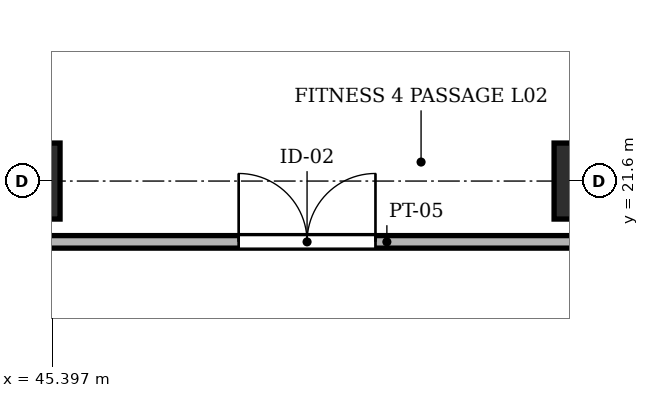
"""IFC4 building model, lengths in metres.
Left out: names, types, materials, properties, quantities, classifications, styles, units other than length and angle.
Written with IfcOpenShell. Run it as: python <this file> out.ifc"""

import sys

from ifc_helpers import new_model, si_unit, direction, frame, frame_2d, origin, origin_2d, place, context, subcontext, project, spatial, rectangle, extrude, element, fill, save


model = new_model("IFC4")
c1 = context("Model", 3, precision=1e-05, world=origin(), true_north=direction((0.0, 1.0)))
c2 = subcontext(c1, "Body", "Model", "MODEL_VIEW")
j1 = project(units=[si_unit("LENGTHUNIT", "METRE"), si_unit("PLANEANGLEUNIT", "RADIAN")], contexts=[c1])
p1 = place(None, origin())
s1 = spatial("IfcSite", under=j1, at=p1, CompositionType="ELEMENT")
p2 = place(p1, origin())
s2 = spatial("IfcBuilding", under=s1, at=p2, CompositionType="ELEMENT")
p3 = place(p2, frame((0.0, 0.0, 9.4)))
s3 = spatial("IfcBuildingStorey", under=s2, at=p3, CompositionType="ELEMENT", Elevation=9.4)
for number, where, z_axis, x_axis in (
    (1, (45.0, 21.6, -0.45), (0.0, 0.0, 1.0), (1.0, 0.0, 0.0)),
    (2, (52.5, 21.6, -0.45), (0.0, 0.0, 1.0), (1.0, 0.0, 0.0)),
):
    element("IfcColumn", number, at=place(p3, frame(where, z_axis=z_axis, x_axis=x_axis)), inside=s3, PredefinedType="COLUMN", context=c2, shape_type="SweptSolid", body=[
        extrude(rectangle(XDim=1.0, YDim=1.0, at=origin_2d()), origin(), (0.0, 0.0, 1.0), 4.77),
    ])
p4 = place(p3, frame((38.3, 20.8, 0.0), z_axis=(0.0, 0.0, 1.0), x_axis=(1.0, 0.0, 0.0)))
e3 = element("IfcWall", 3, at=p4, inside=s3, PredefinedType="PARTITIONING", context=c2, shape_type="SweptSolid", body=[
    extrude(rectangle(XDim=28.9, YDim=0.165, at=frame_2d((14.45, 0.0))), origin(), (0.0, 0.0, 1.0), 3.88),
])
p5 = place(p4, frame((9.55, 0.0, 0.0)))
e4 = element("IfcOpeningElement", 4, at=p5, cuts=e3, PredefinedType="OPENING", context=c2, shape_type="SweptSolid", body=[
    extrude(rectangle(XDim=1.8, YDim=2.25, at=frame_2d((0.9, 1.125))), frame((0.0, 0.094, 0.0), z_axis=(0.0, -1.0, 0.0), x_axis=(1.0, 0.0, 0.0)), (0.0, 0.0, 1.0), 0.189),
])
p6 = place(p5, origin())
e5 = element("IfcDoor", 5, at=p6, inside=s3, OperationType="DOUBLE_DOOR_SINGLE_SWING", PredefinedType="DOOR", context=c2, shape_type="SweptSolid", body=[
    extrude(rectangle(XDim=1.8, YDim=2.25, at=frame_2d((0.9, 1.125))), frame((0.0, 0.025, 0.0), z_axis=(0.0, -1.0, 0.0), x_axis=(1.0, 0.0, 0.0)), (0.0, 0.0, 1.0), 0.05),
])
fill(e4, e5)
save(model, sys.argv[1])
